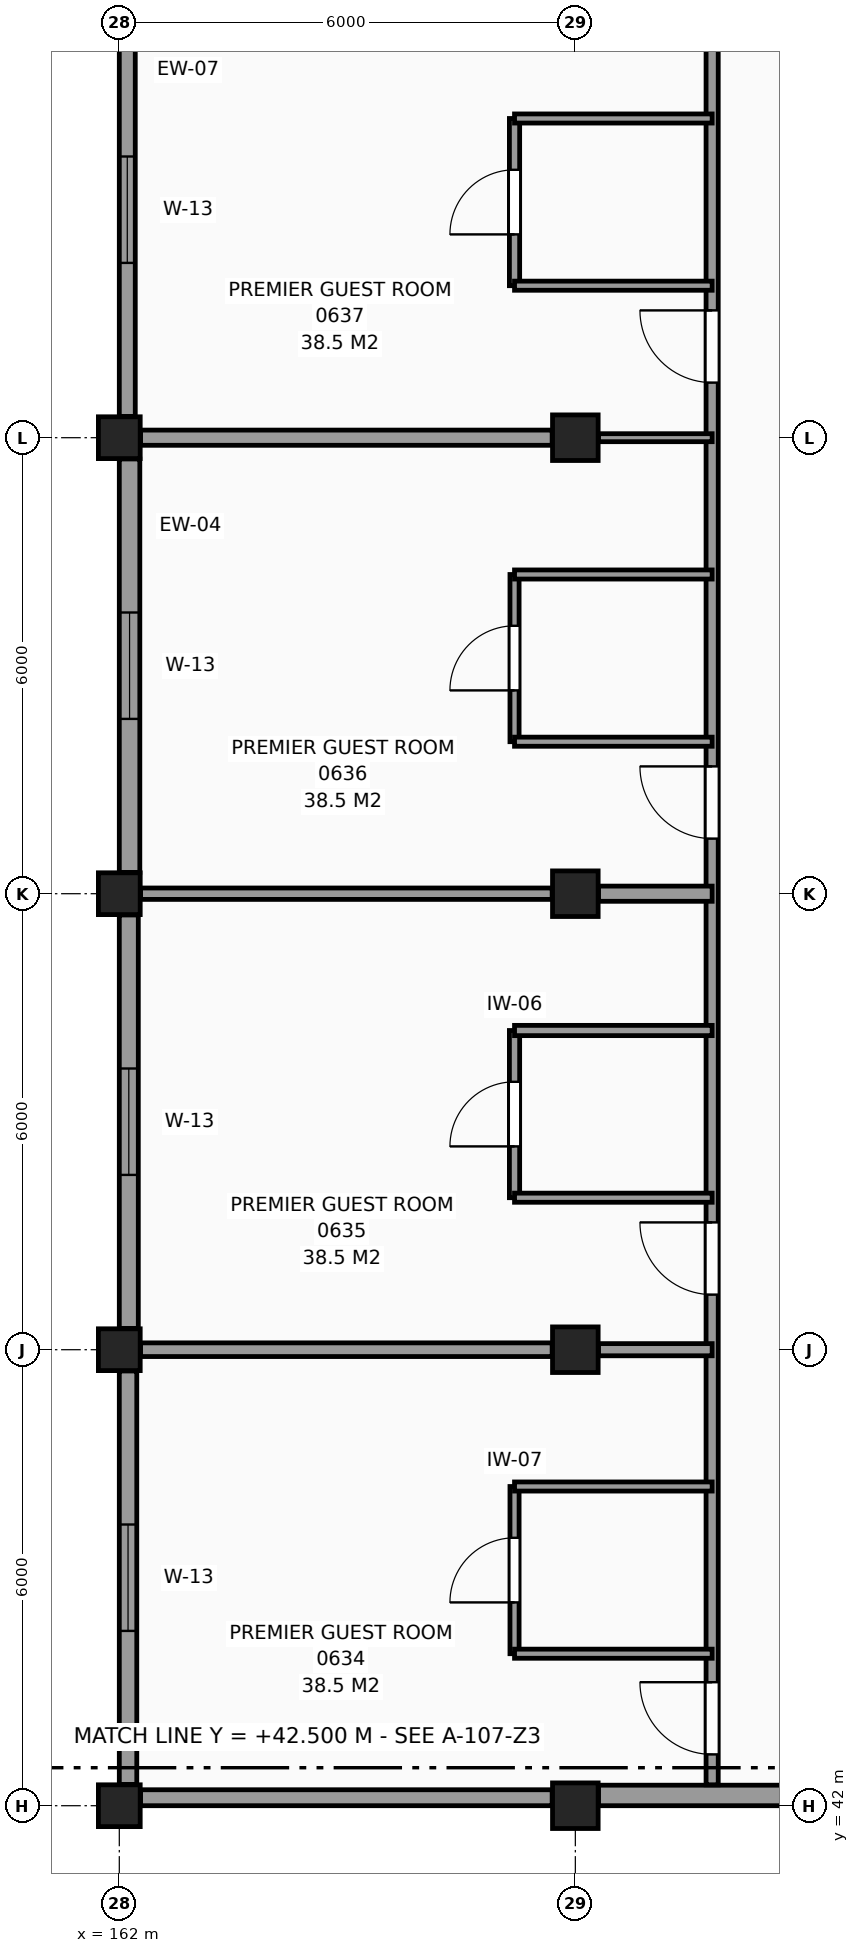
"""IFC4 building model, lengths in metres.
Left out: names, types, materials, properties, quantities, classifications, styles, units other than length and angle.
Written with IfcOpenShell. Run it as: python <this file> out.ifc"""

import sys

from ifc_helpers import new_model, si_unit, direction, frame, frame_2d, origin, origin_2d, place, context, subcontext, project, spatial, rectangle, extrude, element, fill, save


model = new_model("IFC4")
c1 = context("Model", 3, precision=1e-05, world=origin(), true_north=direction((0.0, 1.0)))
c2 = subcontext(c1, "Body", "Model", "MODEL_VIEW")
j1 = project(units=[si_unit("LENGTHUNIT", "METRE"), si_unit("PLANEANGLEUNIT", "RADIAN")], contexts=[c1])
p1 = place(None, origin())
s1 = spatial("IfcSite", under=j1, at=p1, CompositionType="ELEMENT")
p2 = place(p1, origin())
s2 = spatial("IfcBuilding", under=s1, at=p2, CompositionType="ELEMENT")
p3 = place(p2, frame((0.0, 0.0, 28.2)))
s3 = spatial("IfcBuildingStorey", under=s2, at=p3, CompositionType="ELEMENT", Elevation=28.2)
for number, where, z_axis, x_axis in (
    (1, (162.0, 42.0, 0.0), (0.0, 0.0, 1.0), (1.0, 0.0, 0.0)),
    (2, (162.0, 48.0, 0.0), (0.0, 0.0, 1.0), (1.0, 0.0, 0.0)),
    (3, (162.0, 54.0, 0.0), (0.0, 0.0, 1.0), (1.0, 0.0, 0.0)),
    (4, (162.0, 60.0, 0.0), (0.0, 0.0, 1.0), (1.0, 0.0, 0.0)),
):
    element("IfcColumn", number, at=place(p3, frame(where, z_axis=z_axis, x_axis=x_axis)), inside=s3, PredefinedType="COLUMN", context=c2, shape_type="SweptSolid", body=[
        extrude(rectangle(XDim=0.55, YDim=0.55, at=origin_2d()), origin(), (0.0, 0.0, 1.0), 3.3),
    ])
for number, where, z_axis, x_axis in (
    (5, (168.0, 42.0, 0.0), (0.0, 0.0, 1.0), (1.0, 0.0, 0.0)),
    (6, (168.0, 48.0, 0.0), (0.0, 0.0, 1.0), (1.0, 0.0, 0.0)),
    (7, (168.0, 54.0, 0.0), (0.0, 0.0, 1.0), (1.0, 0.0, 0.0)),
    (8, (168.0, 60.0, 0.0), (0.0, 0.0, 1.0), (1.0, 0.0, 0.0)),
):
    element("IfcColumn", number, at=place(p3, frame(where, z_axis=z_axis, x_axis=x_axis)), inside=s3, PredefinedType="COLUMN", context=c2, shape_type="SweptSolid", body=[
        extrude(rectangle(XDim=0.6, YDim=0.6, at=origin_2d()), origin(), (0.0, 0.0, 1.0), 3.3),
    ])
p4 = place(p3, frame((162.105, 65.72, 0.0), z_axis=(0.0, 0.0, 1.0), x_axis=(0.0, -1.0, 0.0)))
e9 = element("IfcWall", 9, at=p4, inside=s3, PredefinedType="SOLIDWALL", context=c2, shape_type="SweptSolid", body=[
    extrude(rectangle(XDim=5.44, YDim=0.21, at=frame_2d((2.72, 0.0))), origin(), (0.0, 0.0, 1.0), 2.43),
])
p5 = place(p4, frame((2.02, 0.0, 0.8)))
e10 = element("IfcOpeningElement", 10, at=p5, cuts=e9, PredefinedType="OPENING", context=c2, shape_type="SweptSolid", body=[
    extrude(rectangle(XDim=1.4, YDim=1.4, at=frame_2d((0.7, 0.7))), frame((0.0, 0.115, 0.0), z_axis=(0.0, -1.0, 0.0), x_axis=(1.0, 0.0, 0.0)), (0.0, 0.0, 1.0), 0.23),
])
p6 = place(p3, frame((162.135, 59.72, 0.0), z_axis=(0.0, 0.0, 1.0), x_axis=(0.0, -1.0, 0.0)))
e11 = element("IfcWall", 11, at=p6, inside=s3, PredefinedType="SOLIDWALL", context=c2, shape_type="SweptSolid", body=[
    extrude(rectangle(XDim=5.44, YDim=0.27, at=frame_2d((2.72, 0.0))), origin(), (0.0, 0.0, 1.0), 2.43),
])
p7 = place(p6, frame((2.02, 0.0, 0.8)))
e12 = element("IfcOpeningElement", 12, at=p7, cuts=e11, PredefinedType="OPENING", context=c2, shape_type="SweptSolid", body=[
    extrude(rectangle(XDim=1.4, YDim=1.4, at=frame_2d((0.7, 0.7))), frame((0.0, 0.145, 0.0), z_axis=(0.0, -1.0, 0.0), x_axis=(1.0, 0.0, 0.0)), (0.0, 0.0, 1.0), 0.29),
])
p8 = place(p3, frame((162.125, 53.72, 0.0), z_axis=(0.0, 0.0, 1.0), x_axis=(0.0, -1.0, 0.0)))
e13 = element("IfcWall", 13, at=p8, inside=s3, PredefinedType="SOLIDWALL", context=c2, shape_type="SweptSolid", body=[
    extrude(rectangle(XDim=5.44, YDim=0.25, at=frame_2d((2.72, 0.0))), origin(), (0.0, 0.0, 1.0), 2.43),
])
p9 = place(p8, frame((2.02, 0.0, 0.8)))
e14 = element("IfcOpeningElement", 14, at=p9, cuts=e13, PredefinedType="OPENING", context=c2, shape_type="SweptSolid", body=[
    extrude(rectangle(XDim=1.4, YDim=1.4, at=frame_2d((0.7, 0.7))), frame((0.0, 0.135, 0.0), z_axis=(0.0, -1.0, 0.0), x_axis=(1.0, 0.0, 0.0)), (0.0, 0.0, 1.0), 0.27),
])
p10 = place(p3, frame((162.115, 47.72, 0.0), z_axis=(0.0, 0.0, 1.0), x_axis=(0.0, -1.0, 0.0)))
e15 = element("IfcWall", 15, at=p10, inside=s3, PredefinedType="SOLIDWALL", context=c2, shape_type="SweptSolid", body=[
    extrude(rectangle(XDim=5.44, YDim=0.23, at=frame_2d((2.72, 0.0))), origin(), (0.0, 0.0, 1.0), 2.43),
])
p11 = place(p10, frame((2.02, 0.0, 0.8)))
e16 = element("IfcOpeningElement", 16, at=p11, cuts=e15, PredefinedType="OPENING", context=c2, shape_type="SweptSolid", body=[
    extrude(rectangle(XDim=1.4, YDim=1.4, at=frame_2d((0.7, 0.7))), frame((0.0, 0.125, 0.0), z_axis=(0.0, -1.0, 0.0), x_axis=(1.0, 0.0, 0.0)), (0.0, 0.0, 1.0), 0.25),
])
p12 = place(p3, frame((162.28, 42.105, 0.0), z_axis=(0.0, 0.0, 1.0), x_axis=(1.0, 0.0, 0.0)))
e17 = element("IfcWall", 17, at=p12, inside=s3, PredefinedType="SOLIDWALL", context=c2, shape_type="SweptSolid", body=[
    extrude(rectangle(XDim=5.415, YDim=0.21, at=frame_2d((2.708, 0.0))), origin(), (0.0, 0.0, 1.0), 2.28),
])
p13 = place(p3, frame((168.305, 42.135, 0.0), z_axis=(0.0, 0.0, 1.0), x_axis=(1.0, 0.0, 0.0)))
e18 = element("IfcWall", 18, at=p13, inside=s3, PredefinedType="SOLIDWALL", context=c2, shape_type="SweptSolid", body=[
    extrude(rectangle(XDim=5.415, YDim=0.27, at=frame_2d((2.708, 0.0))), origin(), (0.0, 0.0, 1.0), 2.28),
])
p14 = place(p3, frame((167.2, 44.0, 0.0), z_axis=(0.0, 0.0, 1.0), x_axis=(0.0, 1.0, 0.0)))
e19 = element("IfcWall", 19, at=p14, inside=s3, PredefinedType="PARTITIONING", context=c2, shape_type="SweptSolid", body=[
    extrude(rectangle(XDim=2.2, YDim=0.12, at=frame_2d((1.1, 0.0))), origin(), (0.0, 0.0, 1.0), 3.08),
])
p15 = place(p14, frame((0.675, 0.0, 0.0)))
e20 = element("IfcOpeningElement", 20, at=p15, cuts=e19, PredefinedType="OPENING", context=c2, shape_type="SweptSolid", body=[
    extrude(rectangle(XDim=0.85, YDim=2.1, at=frame_2d((0.425, 1.05))), frame((0.0, 0.07, 0.0), z_axis=(0.0, -1.0, 0.0), x_axis=(1.0, 0.0, 0.0)), (0.0, 0.0, 1.0), 0.14),
])
p16 = place(p3, frame((167.2, 50.0, 0.0), z_axis=(0.0, 0.0, 1.0), x_axis=(0.0, 1.0, 0.0)))
e21 = element("IfcWall", 21, at=p16, inside=s3, PredefinedType="PARTITIONING", context=c2, shape_type="SweptSolid", body=[
    extrude(rectangle(XDim=2.2, YDim=0.135, at=frame_2d((1.1, 0.0))), origin(), (0.0, 0.0, 1.0), 3.08),
])
p17 = place(p16, frame((0.675, 0.0, 0.0)))
e22 = element("IfcOpeningElement", 22, at=p17, cuts=e21, PredefinedType="OPENING", context=c2, shape_type="SweptSolid", body=[
    extrude(rectangle(XDim=0.85, YDim=2.1, at=frame_2d((0.425, 1.05))), frame((0.0, 0.078, 0.0), z_axis=(0.0, -1.0, 0.0), x_axis=(1.0, 0.0, 0.0)), (0.0, 0.0, 1.0), 0.155),
])
p18 = place(p3, frame((167.2, 56.0, 0.0), z_axis=(0.0, 0.0, 1.0), x_axis=(0.0, 1.0, 0.0)))
e23 = element("IfcWall", 23, at=p18, inside=s3, PredefinedType="PARTITIONING", context=c2, shape_type="SweptSolid", body=[
    extrude(rectangle(XDim=2.2, YDim=0.12, at=frame_2d((1.1, 0.0))), origin(), (0.0, 0.0, 1.0), 3.08),
])
p19 = place(p18, frame((0.675, 0.0, 0.0)))
e24 = element("IfcOpeningElement", 24, at=p19, cuts=e23, PredefinedType="OPENING", context=c2, shape_type="SweptSolid", body=[
    extrude(rectangle(XDim=0.85, YDim=2.1, at=frame_2d((0.425, 1.05))), frame((0.0, 0.07, 0.0), z_axis=(0.0, -1.0, 0.0), x_axis=(1.0, 0.0, 0.0)), (0.0, 0.0, 1.0), 0.14),
])
p20 = place(p3, frame((167.2, 62.0, 0.0), z_axis=(0.0, 0.0, 1.0), x_axis=(0.0, 1.0, 0.0)))
e25 = element("IfcWall", 25, at=p20, inside=s3, PredefinedType="PARTITIONING", context=c2, shape_type="SweptSolid", body=[
    extrude(rectangle(XDim=2.2, YDim=0.135, at=frame_2d((1.1, 0.0))), origin(), (0.0, 0.0, 1.0), 3.08),
])
p21 = place(p20, frame((0.675, 0.0, 0.0)))
e26 = element("IfcOpeningElement", 26, at=p21, cuts=e25, PredefinedType="OPENING", context=c2, shape_type="SweptSolid", body=[
    extrude(rectangle(XDim=0.85, YDim=2.1, at=frame_2d((0.425, 1.05))), frame((0.0, 0.078, 0.0), z_axis=(0.0, -1.0, 0.0), x_axis=(1.0, 0.0, 0.0)), (0.0, 0.0, 1.0), 0.155),
])
p22 = place(p3, frame((169.8, 42.275, 0.0), z_axis=(0.0, 0.0, 1.0), x_axis=(0.0, 1.0, 0.0)))
e27 = element("IfcWall", 27, at=p22, inside=s3, PredefinedType="PARTITIONING", context=c2, shape_type="SweptSolid", body=[
    extrude(rectangle(XDim=65.545, YDim=0.16, at=frame_2d((32.772, 0.0))), origin(), (0.0, 0.0, 1.0), 3.08),
])
p23 = place(p22, frame((50.125, 0.0, 0.0)))
e28 = element("IfcOpeningElement", 28, at=p23, cuts=e27, PredefinedType="OPENING", context=c2, shape_type="SweptSolid", body=[
    extrude(rectangle(XDim=1.2, YDim=2.2, at=frame_2d((0.6, 1.1))), frame((0.0, 0.09, 0.0), z_axis=(0.0, -1.0, 0.0), x_axis=(1.0, 0.0, 0.0)), (0.0, 0.0, 1.0), 0.18),
])
p24 = place(p22, frame((0.4, 0.0, 0.0)))
e29 = element("IfcOpeningElement", 29, at=p24, cuts=e27, PredefinedType="OPENING", context=c2, shape_type="SweptSolid", body=[
    extrude(rectangle(XDim=0.95, YDim=2.1, at=frame_2d((0.475, 1.05))), frame((0.0, 0.09, 0.0), z_axis=(0.0, -1.0, 0.0), x_axis=(1.0, 0.0, 0.0)), (0.0, 0.0, 1.0), 0.18),
])
p25 = place(p22, frame((6.45, 0.0, 0.0)))
e30 = element("IfcOpeningElement", 30, at=p25, cuts=e27, PredefinedType="OPENING", context=c2, shape_type="SweptSolid", body=[
    extrude(rectangle(XDim=0.95, YDim=2.1, at=frame_2d((0.475, 1.05))), frame((0.0, 0.09, 0.0), z_axis=(0.0, -1.0, 0.0), x_axis=(1.0, 0.0, 0.0)), (0.0, 0.0, 1.0), 0.18),
])
p26 = place(p22, frame((12.45, 0.0, 0.0)))
e31 = element("IfcOpeningElement", 31, at=p26, cuts=e27, PredefinedType="OPENING", context=c2, shape_type="SweptSolid", body=[
    extrude(rectangle(XDim=0.95, YDim=2.1, at=frame_2d((0.475, 1.05))), frame((0.0, 0.09, 0.0), z_axis=(0.0, -1.0, 0.0), x_axis=(1.0, 0.0, 0.0)), (0.0, 0.0, 1.0), 0.18),
])
p27 = place(p22, frame((18.45, 0.0, 0.0)))
e32 = element("IfcOpeningElement", 32, at=p27, cuts=e27, PredefinedType="OPENING", context=c2, shape_type="SweptSolid", body=[
    extrude(rectangle(XDim=0.95, YDim=2.1, at=frame_2d((0.475, 1.05))), frame((0.0, 0.09, 0.0), z_axis=(0.0, -1.0, 0.0), x_axis=(1.0, 0.0, 0.0)), (0.0, 0.0, 1.0), 0.18),
])
p28 = place(p22, frame((24.45, 0.0, 0.0)))
e33 = element("IfcOpeningElement", 33, at=p28, cuts=e27, PredefinedType="OPENING", context=c2, shape_type="SweptSolid", body=[
    extrude(rectangle(XDim=0.95, YDim=2.1, at=frame_2d((0.475, 1.05))), frame((0.0, 0.09, 0.0), z_axis=(0.0, -1.0, 0.0), x_axis=(1.0, 0.0, 0.0)), (0.0, 0.0, 1.0), 0.18),
])
p29 = place(p22, frame((30.45, 0.0, 0.0)))
e34 = element("IfcOpeningElement", 34, at=p29, cuts=e27, PredefinedType="OPENING", context=c2, shape_type="SweptSolid", body=[
    extrude(rectangle(XDim=0.95, YDim=2.1, at=frame_2d((0.475, 1.05))), frame((0.0, 0.09, 0.0), z_axis=(0.0, -1.0, 0.0), x_axis=(1.0, 0.0, 0.0)), (0.0, 0.0, 1.0), 0.18),
])
p30 = place(p22, frame((54.45, 0.0, 0.0)))
e35 = element("IfcOpeningElement", 35, at=p30, cuts=e27, PredefinedType="OPENING", context=c2, shape_type="SweptSolid", body=[
    extrude(rectangle(XDim=0.95, YDim=2.1, at=frame_2d((0.475, 1.05))), frame((0.0, 0.09, 0.0), z_axis=(0.0, -1.0, 0.0), x_axis=(1.0, 0.0, 0.0)), (0.0, 0.0, 1.0), 0.18),
])
p31 = place(p22, frame((60.45, 0.0, 0.0)))
e36 = element("IfcOpeningElement", 36, at=p31, cuts=e27, PredefinedType="OPENING", context=c2, shape_type="SweptSolid", body=[
    extrude(rectangle(XDim=0.95, YDim=2.1, at=frame_2d((0.475, 1.05))), frame((0.0, 0.09, 0.0), z_axis=(0.0, -1.0, 0.0), x_axis=(1.0, 0.0, 0.0)), (0.0, 0.0, 1.0), 0.18),
])
for number, where, z_axis, x_axis in (
    (37, (167.2, 44.0, 0.0), (0.0, 0.0, 1.0), (1.0, 0.0, 0.0)),
    (38, (167.2, 46.2, 0.0), (0.0, 0.0, 1.0), (1.0, 0.0, 0.0)),
):
    element("IfcWall", number, at=place(p3, frame(where, z_axis=z_axis, x_axis=x_axis)), inside=s3, PredefinedType="PARTITIONING", context=c2, shape_type="SweptSolid", body=[
        extrude(rectangle(XDim=2.6, YDim=0.12, at=frame_2d((1.3, 0.0))), origin(), (0.0, 0.0, 1.0), 3.08),
    ])
p32 = place(p3, frame((162.28, 48.0, 0.0), z_axis=(0.0, 0.0, 1.0), x_axis=(1.0, 0.0, 0.0)))
e39 = element("IfcWall", 39, at=p32, inside=s3, PredefinedType="PARTITIONING", context=c2, shape_type="SweptSolid", body=[
    extrude(rectangle(XDim=5.415, YDim=0.18, at=frame_2d((2.708, 0.0))), origin(), (0.0, 0.0, 1.0), 2.79),
])
p33 = place(p3, frame((168.305, 48.0, 0.0), z_axis=(0.0, 0.0, 1.0), x_axis=(1.0, 0.0, 0.0)))
e40 = element("IfcWall", 40, at=p33, inside=s3, PredefinedType="PARTITIONING", context=c2, shape_type="SweptSolid", body=[
    extrude(rectangle(XDim=1.495, YDim=0.16, at=frame_2d((0.748, 0.0))), origin(), (0.0, 0.0, 1.0), 2.28),
])
p34 = place(p3, frame((167.2, 50.0, 0.0), z_axis=(0.0, 0.0, 1.0), x_axis=(1.0, 0.0, 0.0)))
e41 = element("IfcWall", 41, at=p34, inside=s3, PredefinedType="PARTITIONING", context=c2, shape_type="SweptSolid", body=[
    extrude(rectangle(XDim=2.6, YDim=0.12, at=frame_2d((1.3, 0.0))), origin(), (0.0, 0.0, 1.0), 3.08),
])
p35 = place(p3, frame((167.2, 52.2, 0.0), z_axis=(0.0, 0.0, 1.0), x_axis=(1.0, 0.0, 0.0)))
e42 = element("IfcWall", 42, at=p35, inside=s3, PredefinedType="PARTITIONING", context=c2, shape_type="SweptSolid", body=[
    extrude(rectangle(XDim=2.6, YDim=0.135, at=frame_2d((1.3, 0.0))), origin(), (0.0, 0.0, 1.0), 3.08),
])
p36 = place(p3, frame((162.28, 54.0, 0.0), z_axis=(0.0, 0.0, 1.0), x_axis=(1.0, 0.0, 0.0)))
e43 = element("IfcWall", 43, at=p36, inside=s3, PredefinedType="PARTITIONING", context=c2, shape_type="SweptSolid", body=[
    extrude(rectangle(XDim=5.415, YDim=0.15, at=frame_2d((2.708, 0.0))), origin(), (0.0, 0.0, 1.0), 2.28),
])
p37 = place(p3, frame((168.305, 54.0, 0.0), z_axis=(0.0, 0.0, 1.0), x_axis=(1.0, 0.0, 0.0)))
e44 = element("IfcWall", 44, at=p37, inside=s3, PredefinedType="PARTITIONING", context=c2, shape_type="SweptSolid", body=[
    extrude(rectangle(XDim=1.495, YDim=0.2, at=frame_2d((0.748, 0.0))), origin(), (0.0, 0.0, 1.0), 2.28),
])
for number, where, z_axis, x_axis in (
    (45, (167.2, 56.0, 0.0), (0.0, 0.0, 1.0), (1.0, 0.0, 0.0)),
    (46, (167.2, 58.2, 0.0), (0.0, 0.0, 1.0), (1.0, 0.0, 0.0)),
):
    element("IfcWall", number, at=place(p3, frame(where, z_axis=z_axis, x_axis=x_axis)), inside=s3, PredefinedType="PARTITIONING", context=c2, shape_type="SweptSolid", body=[
        extrude(rectangle(XDim=2.6, YDim=0.12, at=frame_2d((1.3, 0.0))), origin(), (0.0, 0.0, 1.0), 3.08),
    ])
p38 = place(p3, frame((162.28, 60.0, 0.0), z_axis=(0.0, 0.0, 1.0), x_axis=(1.0, 0.0, 0.0)))
e47 = element("IfcWall", 47, at=p38, inside=s3, PredefinedType="PARTITIONING", context=c2, shape_type="SweptSolid", body=[
    extrude(rectangle(XDim=5.415, YDim=0.2, at=frame_2d((2.708, 0.0))), origin(), (0.0, 0.0, 1.0), 2.28),
])
p39 = place(p3, frame((168.305, 60.0, 0.0), z_axis=(0.0, 0.0, 1.0), x_axis=(1.0, 0.0, 0.0)))
e48 = element("IfcWall", 48, at=p39, inside=s3, PredefinedType="PARTITIONING", context=c2, shape_type="SweptSolid", body=[
    extrude(rectangle(XDim=1.495, YDim=0.105, at=frame_2d((0.748, 0.0))), origin(), (0.0, 0.0, 1.0), 2.28),
])
for number, where, z_axis, x_axis in (
    (49, (167.2, 62.0, 0.0), (0.0, 0.0, 1.0), (1.0, 0.0, 0.0)),
    (50, (167.2, 64.2, 0.0), (0.0, 0.0, 1.0), (1.0, 0.0, 0.0)),
):
    element("IfcWall", number, at=place(p3, frame(where, z_axis=z_axis, x_axis=x_axis)), inside=s3, PredefinedType="PARTITIONING", context=c2, shape_type="SweptSolid", body=[
        extrude(rectangle(XDim=2.6, YDim=0.12, at=frame_2d((1.3, 0.0))), origin(), (0.0, 0.0, 1.0), 3.08),
    ])
p40 = place(p11, origin())
e51 = element("IfcWindow", 51, at=p40, inside=s3, PartitioningType="SINGLE_PANEL", PredefinedType="WINDOW", context=c2, shape_type="SweptSolid", body=[
    extrude(rectangle(XDim=1.4, YDim=1.4, at=frame_2d((0.7, 0.7))), frame((0.0, 0.03, 0.0), z_axis=(0.0, -1.0, 0.0), x_axis=(1.0, 0.0, 0.0)), (0.0, 0.0, 1.0), 0.06),
])
fill(e16, e51)
p41 = place(p9, origin())
e52 = element("IfcWindow", 52, at=p41, inside=s3, PartitioningType="SINGLE_PANEL", PredefinedType="WINDOW", context=c2, shape_type="SweptSolid", body=[
    extrude(rectangle(XDim=1.4, YDim=1.4, at=frame_2d((0.7, 0.7))), frame((0.0, 0.03, 0.0), z_axis=(0.0, -1.0, 0.0), x_axis=(1.0, 0.0, 0.0)), (0.0, 0.0, 1.0), 0.06),
])
fill(e14, e52)
p42 = place(p7, origin())
e53 = element("IfcWindow", 53, at=p42, inside=s3, PartitioningType="SINGLE_PANEL", PredefinedType="WINDOW", context=c2, shape_type="SweptSolid", body=[
    extrude(rectangle(XDim=1.4, YDim=1.4, at=frame_2d((0.7, 0.7))), frame((0.0, 0.03, 0.0), z_axis=(0.0, -1.0, 0.0), x_axis=(1.0, 0.0, 0.0)), (0.0, 0.0, 1.0), 0.06),
])
fill(e12, e53)
p43 = place(p5, origin())
e54 = element("IfcWindow", 54, at=p43, inside=s3, PartitioningType="SINGLE_PANEL", PredefinedType="WINDOW", context=c2, shape_type="SweptSolid", body=[
    extrude(rectangle(XDim=1.4, YDim=1.4, at=frame_2d((0.7, 0.7))), frame((0.0, 0.03, 0.0), z_axis=(0.0, -1.0, 0.0), x_axis=(1.0, 0.0, 0.0)), (0.0, 0.0, 1.0), 0.06),
])
fill(e10, e54)
p44 = place(p15, origin())
e55 = element("IfcDoor", 55, at=p44, inside=s3, OperationType="SINGLE_SWING_LEFT", PredefinedType="DOOR", context=c2, shape_type="SweptSolid", body=[
    extrude(rectangle(XDim=0.85, YDim=2.1, at=frame_2d((0.425, 1.05))), frame((0.0, 0.025, 0.0), z_axis=(0.0, -1.0, 0.0), x_axis=(1.0, 0.0, 0.0)), (0.0, 0.0, 1.0), 0.05),
])
fill(e20, e55)
p45 = place(p24, origin())
e56 = element("IfcDoor", 56, at=p45, inside=s3, OperationType="SINGLE_SWING_RIGHT", PredefinedType="DOOR", context=c2, shape_type="SweptSolid", body=[
    extrude(rectangle(XDim=0.95, YDim=2.1, at=frame_2d((0.475, 1.05))), frame((0.0, 0.025, 0.0), z_axis=(0.0, -1.0, 0.0), x_axis=(1.0, 0.0, 0.0)), (0.0, 0.0, 1.0), 0.05),
])
fill(e29, e56)
p46 = place(p17, origin())
e57 = element("IfcDoor", 57, at=p46, inside=s3, OperationType="SINGLE_SWING_LEFT", PredefinedType="DOOR", context=c2, shape_type="SweptSolid", body=[
    extrude(rectangle(XDim=0.85, YDim=2.1, at=frame_2d((0.425, 1.05))), frame((0.0, 0.025, 0.0), z_axis=(0.0, -1.0, 0.0), x_axis=(1.0, 0.0, 0.0)), (0.0, 0.0, 1.0), 0.05),
])
fill(e22, e57)
p47 = place(p25, origin())
e58 = element("IfcDoor", 58, at=p47, inside=s3, OperationType="SINGLE_SWING_RIGHT", PredefinedType="DOOR", context=c2, shape_type="SweptSolid", body=[
    extrude(rectangle(XDim=0.95, YDim=2.1, at=frame_2d((0.475, 1.05))), frame((0.0, 0.025, 0.0), z_axis=(0.0, -1.0, 0.0), x_axis=(1.0, 0.0, 0.0)), (0.0, 0.0, 1.0), 0.05),
])
fill(e30, e58)
p48 = place(p19, origin())
e59 = element("IfcDoor", 59, at=p48, inside=s3, OperationType="SINGLE_SWING_LEFT", PredefinedType="DOOR", context=c2, shape_type="SweptSolid", body=[
    extrude(rectangle(XDim=0.85, YDim=2.1, at=frame_2d((0.425, 1.05))), frame((0.0, 0.025, 0.0), z_axis=(0.0, -1.0, 0.0), x_axis=(1.0, 0.0, 0.0)), (0.0, 0.0, 1.0), 0.05),
])
fill(e24, e59)
p49 = place(p26, origin())
e60 = element("IfcDoor", 60, at=p49, inside=s3, OperationType="SINGLE_SWING_RIGHT", PredefinedType="DOOR", context=c2, shape_type="SweptSolid", body=[
    extrude(rectangle(XDim=0.95, YDim=2.1, at=frame_2d((0.475, 1.05))), frame((0.0, 0.025, 0.0), z_axis=(0.0, -1.0, 0.0), x_axis=(1.0, 0.0, 0.0)), (0.0, 0.0, 1.0), 0.05),
])
fill(e31, e60)
p50 = place(p21, origin())
e61 = element("IfcDoor", 61, at=p50, inside=s3, OperationType="SINGLE_SWING_LEFT", PredefinedType="DOOR", context=c2, shape_type="SweptSolid", body=[
    extrude(rectangle(XDim=0.85, YDim=2.1, at=frame_2d((0.425, 1.05))), frame((0.0, 0.025, 0.0), z_axis=(0.0, -1.0, 0.0), x_axis=(1.0, 0.0, 0.0)), (0.0, 0.0, 1.0), 0.05),
])
fill(e26, e61)
p51 = place(p27, origin())
e62 = element("IfcDoor", 62, at=p51, inside=s3, OperationType="SINGLE_SWING_RIGHT", PredefinedType="DOOR", context=c2, shape_type="SweptSolid", body=[
    extrude(rectangle(XDim=0.95, YDim=2.1, at=frame_2d((0.475, 1.05))), frame((0.0, 0.025, 0.0), z_axis=(0.0, -1.0, 0.0), x_axis=(1.0, 0.0, 0.0)), (0.0, 0.0, 1.0), 0.05),
])
fill(e32, e62)
save(model, sys.argv[1])
